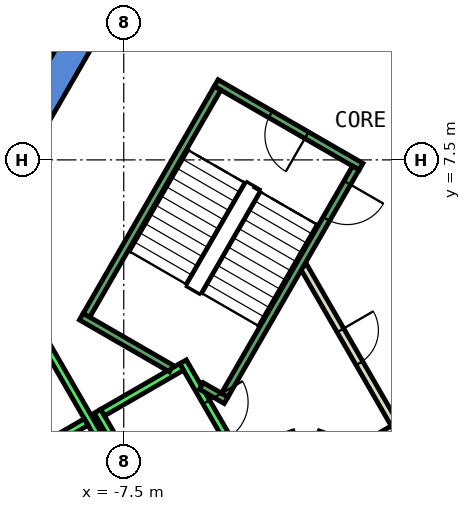
"""IFC4 building model, lengths in metres.
Left out: names, types, materials, properties, quantities, classifications, styles, units other than length and angle.
Written with IfcOpenShell. Run it as: python <this file> out.ifc"""

import sys

from ifc_helpers import new_model, si_unit, direction, frame, frame_2d, origin, place, context, subcontext, project, spatial, polyline, rectangle, outline, extrude, element, fill, save


model = new_model("IFC4")
c1 = context("Model", 3, precision=1e-05, world=origin(), true_north=direction((0.0, 1.0)))
c2 = subcontext(c1, "Body", "Model", "MODEL_VIEW")
j1 = project(units=[si_unit("LENGTHUNIT", "METRE"), si_unit("PLANEANGLEUNIT", "RADIAN")], contexts=[c1])
p1 = place(None, origin())
s1 = spatial("IfcSite", under=j1, at=p1, CompositionType="ELEMENT")
p2 = place(p1, origin())
s2 = spatial("IfcBuilding", under=s1, at=p2, CompositionType="ELEMENT")
p3 = place(p2, frame((0.0, 0.0, 159.2)))
s3 = spatial("IfcBuildingStorey", under=s2, at=p3, CompositionType="ELEMENT", Elevation=159.2)
p4 = place(p3, frame((0.0, 0.0, -0.4)))
e1 = element("IfcWall", 1, at=p4, inside=s3, PredefinedType="SHEAR", context=c2, shape_type="SweptSolid", body=[
    extrude(outline(polyline([(-12.267, 5.252), (-11.575, 4.852), (-6.466, 13.7), (-6.928, 14.5), (-12.267, 5.252)])), origin(), (0.0, 0.0, 1.0), 4.2),
])
p5 = place(p3, frame((0.0, 0.0, -0.4)))
e2 = element("IfcWall", 2, at=p5, inside=s3, PredefinedType="SHEAR", context=c2, shape_type="SweptSolid", body=[
    extrude(outline(polyline([(-13.856, 2.5), (-6.928, -9.5), (-6.466, -8.7), (-12.933, 2.5), (-13.856, 2.5)])), origin(), (0.0, 0.0, 1.0), 4.2),
])
p6 = place(p3, frame((-0.52, -1.0, 0.0), z_axis=(0.0, 0.0, 1.0), x_axis=(0.50011622646, 0.865958290007, 0.0)))
e3 = element("IfcWall", 3, at=p6, inside=s3, PredefinedType="PARTITIONING", context=c2, shape_type="SweptSolid", body=[
    extrude(rectangle(XDim=4.991, YDim=0.2, at=frame_2d((2.496, 0.0))), origin(), (0.0, 0.0, 1.0), 3.8),
])
p7 = place(p6, frame((1.945, 0.0, 0.0)))
e4 = element("IfcOpeningElement", 4, at=p7, cuts=e3, PredefinedType="OPENING", context=c2, shape_type="SweptSolid", body=[
    extrude(rectangle(XDim=1.0, YDim=2.1, at=frame_2d((0.5, 1.05))), frame((0.0, 0.11, 0.0), z_axis=(0.0, -1.0, 0.0), x_axis=(1.0, 0.0, 0.0)), (0.0, 0.0, 1.0), 0.22),
])
p8 = place(p3, frame((-2.771, 4.7, 0.0), z_axis=(0.0, 0.0, 1.0), x_axis=(0.499969479948, -0.866043023828, 0.0)))
e5 = element("IfcWall", 5, at=p8, inside=s3, PredefinedType="PARTITIONING", context=c2, shape_type="SweptSolid", body=[
    extrude(rectangle(XDim=4.99, YDim=0.2, at=frame_2d((2.495, 0.0))), origin(), (0.0, 0.0, 1.0), 3.8),
])
p9 = place(p8, frame((1.945, 0.0, 0.0)))
e6 = element("IfcOpeningElement", 6, at=p9, cuts=e5, PredefinedType="OPENING", context=c2, shape_type="SweptSolid", body=[
    extrude(rectangle(XDim=1.0, YDim=2.1, at=frame_2d((0.5, 1.05))), frame((0.0, 0.11, 0.0), z_axis=(0.0, -1.0, 0.0), x_axis=(1.0, 0.0, 0.0)), (0.0, 0.0, 1.0), 0.22),
])
p10 = place(p3, frame((-0.412, 0.414, 0.0), z_axis=(0.0, 0.0, 1.0), x_axis=(-0.866017369001, -0.500013916395, 0.0)))
e7 = element("IfcWall", 7, at=p10, inside=s3, PredefinedType="PARTITIONING", context=c2, shape_type="SweptSolid", body=[
    extrude(rectangle(XDim=1.45, YDim=0.2, at=frame_2d((0.725, 0.0))), origin(), (0.0, 0.0, 1.0), 3.8),
])
p11 = place(p3, frame((-2.07, 0.16, 0.0), z_axis=(0.0, 0.0, 1.0), x_axis=(-0.942199461132, 0.335052496547, 0.0)))
e8 = element("IfcWall", 8, at=p11, inside=s3, PredefinedType="PARTITIONING", context=c2, shape_type="SweptSolid", body=[
    extrude(rectangle(XDim=0.337, YDim=0.2, at=frame_2d((0.169, 0.0))), origin(), (0.0, 0.0, 1.0), 3.8),
])
p12 = place(p3, frame((-3.012, 0.273, 0.0), z_axis=(0.0, 0.0, 1.0), x_axis=(-0.942280615813, -0.334824194261, 0.0)))
e9 = element("IfcWall", 9, at=p12, inside=s3, PredefinedType="PARTITIONING", context=c2, shape_type="SweptSolid", body=[
    extrude(rectangle(XDim=0.338, YDim=0.2, at=frame_2d((0.169, 0.0))), origin(), (0.0, 0.0, 1.0), 3.8),
])
p13 = place(p3, frame((-5.94, 2.188, 0.0), z_axis=(0.0, 0.0, 1.0), x_axis=(0.49994636267, -0.866056369097, 0.0)))
e10 = element("IfcWall", 10, at=p13, inside=s3, PredefinedType="STANDARD", context=c2, shape_type="SweptSolid", body=[
    extrude(rectangle(XDim=2.8, YDim=0.2, at=frame_2d((1.4, 0.0))), origin(), (0.0, 0.0, 1.0), 3.8),
])
p14 = place(p13, frame((1.225, 0.0, 0.0)))
e11 = element("IfcOpeningElement", 11, at=p14, cuts=e10, PredefinedType="OPENING", context=c2, shape_type="SweptSolid", body=[
    extrude(rectangle(XDim=1.1, YDim=2.1, at=frame_2d((0.55, 1.05))), frame((0.0, 0.11, 0.0), z_axis=(0.0, -1.0, 0.0), x_axis=(1.0, 0.0, 0.0)), (0.0, 0.0, 1.0), 0.22),
])
p15 = place(p3, frame((-8.192, 0.888, 0.0), z_axis=(0.0, 0.0, 1.0), x_axis=(0.49994636267, -0.866056369097, 0.0)))
e12 = element("IfcWall", 12, at=p15, inside=s3, PredefinedType="STANDARD", context=c2, shape_type="SweptSolid", body=[
    extrude(rectangle(XDim=2.8, YDim=0.2, at=frame_2d((1.4, 0.0))), origin(), (0.0, 0.0, 1.0), 3.8),
])
p16 = place(p3, frame((-5.977, 2.052, 0.0), z_axis=(0.0, 0.0, 1.0), x_axis=(-0.865973769406, -0.500089422704, 0.0)))
e13 = element("IfcWall", 13, at=p16, inside=s3, PredefinedType="STANDARD", context=c2, shape_type="SweptSolid", body=[
    extrude(rectangle(XDim=2.399, YDim=0.2, at=frame_2d((1.2, 0.0))), origin(), (0.0, 0.0, 1.0), 3.8),
])
p17 = place(p3, frame((-9.751, 2.99, 0.0), z_axis=(0.0, 0.0, 1.0), x_axis=(0.50000090737, -0.866024879913, 0.0)))
e14 = element("IfcWall", 14, at=p17, inside=s3, PredefinedType="STANDARD", context=c2, shape_type="SweptSolid", body=[
    extrude(rectangle(XDim=10.6, YDim=0.2, at=frame_2d((5.3, 0.0))), origin(), (0.0, 0.0, 1.0), 3.8),
])
p18 = place(p3, frame((-8.488, 0.602, 0.0), z_axis=(0.0, 0.0, 1.0), x_axis=(-0.866022959057, -0.500004234368, 0.0)))
e15 = element("IfcWall", 15, at=p18, inside=s3, PredefinedType="STANDARD", context=c2, shape_type="SweptSolid", body=[
    extrude(rectangle(XDim=2.5, YDim=0.2, at=frame_2d((1.25, 0.0))), origin(), (0.0, 0.0, 1.0), 3.8),
])
p19 = place(p3, frame((-1.256, 7.324, 0.0), z_axis=(0.0, 0.0, 1.0), x_axis=(-0.866046073146, 0.499964197906, 0.0)))
e16 = element("IfcWall", 16, at=p19, inside=s3, PredefinedType="STANDARD", context=c2, shape_type="SweptSolid", body=[
    extrude(rectangle(XDim=4.4, YDim=0.2, at=frame_2d((2.2, 0.0))), origin(), (0.0, 0.0, 1.0), 3.8),
])
p20 = place(p19, frame((1.65, 0.0, 0.0)))
e17 = element("IfcOpeningElement", 17, at=p20, cuts=e16, PredefinedType="OPENING", context=c2, shape_type="SweptSolid", body=[
    extrude(rectangle(XDim=1.1, YDim=2.2, at=frame_2d((0.55, 1.1))), frame((0.0, 0.11, 0.0), z_axis=(0.0, -1.0, 0.0), x_axis=(1.0, 0.0, 0.0)), (0.0, 0.0, 1.0), 0.22),
])
p21 = place(p3, frame((-6.25, 2.01, 0.0), z_axis=(0.0, 0.0, 1.0), x_axis=(-0.86611865017, 0.499838457731, 0.0)))
e18 = element("IfcWall", 18, at=p21, inside=s3, PredefinedType="STANDARD", context=c2, shape_type="SweptSolid", body=[
    extrude(rectangle(XDim=2.733, YDim=0.2, at=frame_2d((1.366, 0.0))), origin(), (0.0, 0.0, 1.0), 3.8),
])
p22 = place(p3, frame((-4.806, 1.176, 0.0), z_axis=(0.0, 0.0, 1.0), x_axis=(-0.866558586415, 0.499075361355, 0.0)))
e19 = element("IfcWall", 19, at=p22, inside=s3, PredefinedType="STANDARD", context=c2, shape_type="SweptSolid", body=[
    extrude(rectangle(XDim=0.751, YDim=0.2, at=frame_2d((0.376, 0.0))), origin(), (0.0, 0.0, 1.0), 3.8),
])
p23 = place(p3, frame((-1.393, 7.288, 0.0), z_axis=(0.0, 0.0, 1.0), x_axis=(-0.499963383562, -0.866046543262, 0.0)))
e20 = element("IfcWall", 20, at=p23, inside=s3, PredefinedType="STANDARD", context=c2, shape_type="SweptSolid", body=[
    extrude(rectangle(XDim=6.9, YDim=0.2, at=frame_2d((3.45, 0.0))), origin(), (0.0, 0.0, 1.0), 3.8),
])
p24 = place(p23, frame((0.45, 0.0, 0.0)))
e21 = element("IfcOpeningElement", 21, at=p24, cuts=e20, PredefinedType="OPENING", context=c2, shape_type="SweptSolid", body=[
    extrude(rectangle(XDim=1.1, YDim=2.2, at=frame_2d((0.55, 1.1))), frame((0.0, 0.11, 0.0), z_axis=(0.0, -1.0, 0.0), x_axis=(1.0, 0.0, 0.0)), (0.0, 0.0, 1.0), 0.22),
])
p25 = place(p3, frame((-5.03, 9.388, 0.0), z_axis=(0.0, 0.0, 1.0), x_axis=(-0.499978703459, -0.866037698999, 0.0)))
e22 = element("IfcWall", 22, at=p25, inside=s3, PredefinedType="STANDARD", context=c2, shape_type="SweptSolid", body=[
    extrude(rectangle(XDim=6.9, YDim=0.2, at=frame_2d((3.45, 0.0))), origin(), (0.0, 0.0, 1.0), 3.8),
])
p26 = place(p9, origin())
e23 = element("IfcDoor", 23, at=p26, inside=s3, OperationType="SINGLE_SWING_RIGHT", PredefinedType="DOOR", context=c2, shape_type="SweptSolid", body=[
    extrude(rectangle(XDim=1.0, YDim=2.1, at=frame_2d((0.5, 1.05))), frame((0.0, 0.025, 0.0), z_axis=(0.0, -1.0, 0.0), x_axis=(1.0, 0.0, 0.0)), (0.0, 0.0, 1.0), 0.05),
])
fill(e6, e23)
p27 = place(p14, origin())
e24 = element("IfcDoor", 24, at=p27, inside=s3, OperationType="SLIDING_TO_LEFT", PredefinedType="DOOR", context=c2, shape_type="SweptSolid", body=[
    extrude(rectangle(XDim=1.1, YDim=2.1, at=frame_2d((0.55, 1.05))), frame((0.0, 0.025, 0.0), z_axis=(0.0, -1.0, 0.0), x_axis=(1.0, 0.0, 0.0)), (0.0, 0.0, 1.0), 0.05),
])
fill(e11, e24)
p28 = place(p24, origin())
e25 = element("IfcDoor", 25, at=p28, inside=s3, OperationType="SINGLE_SWING_LEFT", PredefinedType="DOOR", context=c2, shape_type="SweptSolid", body=[
    extrude(rectangle(XDim=1.1, YDim=2.2, at=frame_2d((0.55, 1.1))), frame((0.0, 0.025, 0.0), z_axis=(0.0, -1.0, 0.0), x_axis=(1.0, 0.0, 0.0)), (0.0, 0.0, 1.0), 0.05),
])
fill(e21, e25)
p29 = place(p20, origin())
e26 = element("IfcDoor", 26, at=p29, inside=s3, OperationType="SINGLE_SWING_LEFT", PredefinedType="DOOR", context=c2, shape_type="SweptSolid", body=[
    extrude(rectangle(XDim=1.1, YDim=2.2, at=frame_2d((0.55, 1.1))), frame((0.0, 0.025, 0.0), z_axis=(0.0, -1.0, 0.0), x_axis=(1.0, 0.0, 0.0)), (0.0, 0.0, 1.0), 0.05),
])
fill(e17, e26)
save(model, sys.argv[1])
